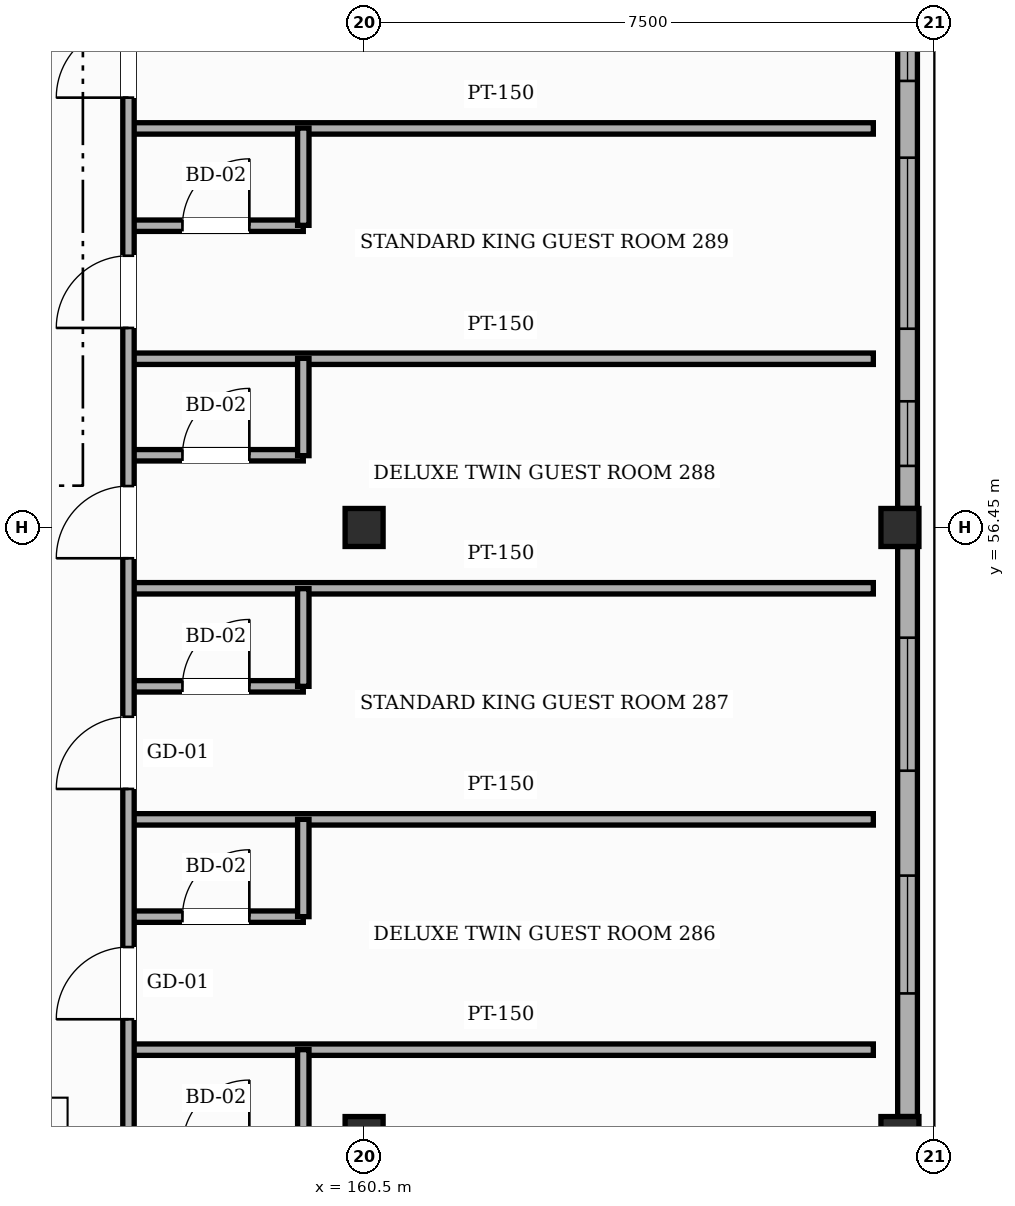
"""IFC4 building model, lengths in metres.
Left out: names, types, materials, properties, quantities, classifications, styles, units other than length and angle.
Written with IfcOpenShell. Run it as: python <this file> out.ifc"""

import sys

from ifc_helpers import new_model, si_unit, direction, frame, frame_2d, origin, origin_2d, place, context, subcontext, project, spatial, rectangle, hollow_rectangle, extrude, element, fill, save


model = new_model("IFC4")
c1 = context("Model", 3, precision=1e-05, world=origin(), true_north=direction((0.0, 1.0)))
c2 = subcontext(c1, "Body", "Model", "MODEL_VIEW")
j1 = project(units=[si_unit("LENGTHUNIT", "METRE"), si_unit("PLANEANGLEUNIT", "RADIAN")], contexts=[c1])
p1 = place(None, origin())
s1 = spatial("IfcSite", under=j1, at=p1, CompositionType="ELEMENT")
p2 = place(p1, origin())
s2 = spatial("IfcBuilding", under=s1, at=p2, CompositionType="ELEMENT")
p3 = place(p2, frame((0.0, 0.0, 39.0)))
s3 = spatial("IfcBuildingStorey", under=s2, at=p3, CompositionType="ELEMENT", Elevation=39.0)
for number, where, z_axis, x_axis in (
    (1, (160.5, 48.45, 0.0), (0.0, 0.0, 1.0), (1.0, 0.0, 0.0)),
    (2, (160.5, 56.45, 0.0), (0.0, 0.0, 1.0), (1.0, 0.0, 0.0)),
    (3, (167.55, 48.45, 0.0), (0.0, 0.0, 1.0), (1.0, 0.0, 0.0)),
    (4, (167.55, 56.45, 0.0), (0.0, 0.0, 1.0), (1.0, 0.0, 0.0)),
):
    element("IfcColumn", number, at=place(p3, frame(where, z_axis=z_axis, x_axis=x_axis)), inside=s3, PredefinedType="COLUMN", context=c2, shape_type="SweptSolid", body=[
        extrude(hollow_rectangle(XDim=0.5, YDim=0.5, WallThickness=0.022, InnerFilletRadius=0.022, OuterFilletRadius=0.044, at=origin_2d()), origin(), (0.0, 0.0, 1.0), 3.6),
    ])
p4 = place(p3, frame((167.65, 56.2, 0.0), z_axis=(0.0, 0.0, 1.0), x_axis=(0.0, -1.0, 0.0)))
e5 = element("IfcWall", 5, at=p4, inside=s3, PredefinedType="SOLIDWALL", context=c2, shape_type="SweptSolid", body=[
    extrude(rectangle(XDim=7.5, YDim=0.26, at=frame_2d((3.75, 0.0))), origin(), (0.0, 0.0, 1.0), 2.755),
])
p5 = place(p4, frame((4.33, 0.0, 0.85)))
e6 = element("IfcOpeningElement", 6, at=p5, cuts=e5, PredefinedType="OPENING", context=c2, shape_type="SweptSolid", body=[
    extrude(rectangle(XDim=1.55, YDim=1.35, at=frame_2d((0.775, 0.675))), frame((0.0, 0.14, 0.0), z_axis=(0.0, -1.0, 0.0), x_axis=(1.0, 0.0, 0.0)), (0.0, 0.0, 1.0), 0.28),
])
p6 = place(p4, frame((1.2, 0.0, 0.85)))
e7 = element("IfcOpeningElement", 7, at=p6, cuts=e5, PredefinedType="OPENING", context=c2, shape_type="SweptSolid", body=[
    extrude(rectangle(XDim=1.75, YDim=1.35, at=frame_2d((0.875, 0.675))), frame((0.0, 0.14, 0.0), z_axis=(0.0, -1.0, 0.0), x_axis=(1.0, 0.0, 0.0)), (0.0, 0.0, 1.0), 0.28),
])
p7 = place(p3, frame((167.65, 64.2, 0.0), z_axis=(0.0, 0.0, 1.0), x_axis=(0.0, -1.0, 0.0)))
e8 = element("IfcWall", 8, at=p7, inside=s3, PredefinedType="SOLIDWALL", context=c2, shape_type="SweptSolid", body=[
    extrude(rectangle(XDim=7.5, YDim=0.26, at=frame_2d((3.75, 0.0))), origin(), (0.0, 0.0, 1.0), 2.755),
])
p8 = place(p7, frame((6.09, 0.0, 0.85)))
e9 = element("IfcOpeningElement", 9, at=p8, cuts=e8, PredefinedType="OPENING", context=c2, shape_type="SweptSolid", body=[
    extrude(rectangle(XDim=0.85, YDim=1.35, at=frame_2d((0.425, 0.675))), frame((0.0, 0.14, 0.0), z_axis=(0.0, -1.0, 0.0), x_axis=(1.0, 0.0, 0.0)), (0.0, 0.0, 1.0), 0.28),
])
p9 = place(p7, frame((2.885, 0.0, 0.85)))
e10 = element("IfcOpeningElement", 10, at=p9, cuts=e8, PredefinedType="OPENING", context=c2, shape_type="SweptSolid", body=[
    extrude(rectangle(XDim=2.25, YDim=1.35, at=frame_2d((1.125, 0.675))), frame((0.0, 0.14, 0.0), z_axis=(0.0, -1.0, 0.0), x_axis=(1.0, 0.0, 0.0)), (0.0, 0.0, 1.0), 0.28),
])
p10 = place(p7, frame((0.625, 0.0, 0.85)))
e11 = element("IfcOpeningElement", 11, at=p10, cuts=e8, PredefinedType="OPENING", context=c2, shape_type="SweptSolid", body=[
    extrude(rectangle(XDim=1.25, YDim=1.5, at=frame_2d((0.625, 0.75))), frame((0.0, 0.14, 0.0), z_axis=(0.0, -1.0, 0.0), x_axis=(1.0, 0.0, 0.0)), (0.0, 0.0, 1.0), 0.28),
])
p11 = place(p3, frame((157.4, 49.58, 0.0), z_axis=(0.0, 0.0, 1.0), x_axis=(1.0, 0.0, 0.0)))
e12 = element("IfcWall", 12, at=p11, inside=s3, PredefinedType="PARTITIONING", context=c2, shape_type="SweptSolid", body=[
    extrude(rectangle(XDim=9.8, YDim=0.15, at=frame_2d((4.9, 0.0))), origin(), (0.0, 0.0, 1.0), 3.365),
])
p12 = place(p3, frame((157.4, 51.33, 0.0), z_axis=(0.0, 0.0, 1.0), x_axis=(1.0, 0.0, 0.0)))
e13 = element("IfcWall", 13, at=p12, inside=s3, PredefinedType="PARTITIONING", context=c2, shape_type="SweptSolid", body=[
    extrude(rectangle(XDim=2.3, YDim=0.15, at=frame_2d((1.15, 0.0))), origin(), (0.0, 0.0, 1.0), 3.365),
])
p13 = place(p12, frame((0.71, 0.0, 0.0)))
e14 = element("IfcOpeningElement", 14, at=p13, cuts=e13, PredefinedType="OPENING", context=c2, shape_type="SweptSolid", body=[
    extrude(rectangle(XDim=0.88, YDim=2.12, at=frame_2d((0.44, 1.06))), frame((0.0, 0.085, 0.0), z_axis=(0.0, -1.0, 0.0), x_axis=(1.0, 0.0, 0.0)), (0.0, 0.0, 1.0), 0.17),
])
p14 = place(p3, frame((157.4, 52.61, 0.0), z_axis=(0.0, 0.0, 1.0), x_axis=(1.0, 0.0, 0.0)))
e15 = element("IfcWall", 15, at=p14, inside=s3, PredefinedType="PARTITIONING", context=c2, shape_type="SweptSolid", body=[
    extrude(rectangle(XDim=9.8, YDim=0.15, at=frame_2d((4.9, 0.0))), origin(), (0.0, 0.0, 1.0), 3.055),
])
p15 = place(p3, frame((157.4, 54.36, 0.0), z_axis=(0.0, 0.0, 1.0), x_axis=(1.0, 0.0, 0.0)))
e16 = element("IfcWall", 16, at=p15, inside=s3, PredefinedType="PARTITIONING", context=c2, shape_type="SweptSolid", body=[
    extrude(rectangle(XDim=2.3, YDim=0.15, at=frame_2d((1.15, 0.0))), origin(), (0.0, 0.0, 1.0), 3.365),
])
p16 = place(p15, frame((0.71, 0.0, 0.0)))
e17 = element("IfcOpeningElement", 17, at=p16, cuts=e16, PredefinedType="OPENING", context=c2, shape_type="SweptSolid", body=[
    extrude(rectangle(XDim=0.88, YDim=2.12, at=frame_2d((0.44, 1.06))), frame((0.0, 0.085, 0.0), z_axis=(0.0, -1.0, 0.0), x_axis=(1.0, 0.0, 0.0)), (0.0, 0.0, 1.0), 0.17),
])
p17 = place(p3, frame((157.4, 55.65, 0.0), z_axis=(0.0, 0.0, 1.0), x_axis=(1.0, 0.0, 0.0)))
e18 = element("IfcWall", 18, at=p17, inside=s3, PredefinedType="PARTITIONING", context=c2, shape_type="SweptSolid", body=[
    extrude(rectangle(XDim=9.8, YDim=0.15, at=frame_2d((4.9, 0.0))), origin(), (0.0, 0.0, 1.0), 3.365),
])
p18 = place(p3, frame((157.4, 57.4, 0.0), z_axis=(0.0, 0.0, 1.0), x_axis=(1.0, 0.0, 0.0)))
e19 = element("IfcWall", 19, at=p18, inside=s3, PredefinedType="PARTITIONING", context=c2, shape_type="SweptSolid", body=[
    extrude(rectangle(XDim=2.3, YDim=0.15, at=frame_2d((1.15, 0.0))), origin(), (0.0, 0.0, 1.0), 3.365),
])
p19 = place(p18, frame((0.71, 0.0, 0.0)))
e20 = element("IfcOpeningElement", 20, at=p19, cuts=e19, PredefinedType="OPENING", context=c2, shape_type="SweptSolid", body=[
    extrude(rectangle(XDim=0.88, YDim=2.12, at=frame_2d((0.44, 1.06))), frame((0.0, 0.085, 0.0), z_axis=(0.0, -1.0, 0.0), x_axis=(1.0, 0.0, 0.0)), (0.0, 0.0, 1.0), 0.17),
])
p20 = place(p3, frame((157.4, 58.67, 0.0), z_axis=(0.0, 0.0, 1.0), x_axis=(1.0, 0.0, 0.0)))
e21 = element("IfcWall", 21, at=p20, inside=s3, PredefinedType="PARTITIONING", context=c2, shape_type="SweptSolid", body=[
    extrude(rectangle(XDim=9.8, YDim=0.15, at=frame_2d((4.9, 0.0))), origin(), (0.0, 0.0, 1.0), 3.365),
])
p21 = place(p3, frame((157.4, 60.42, 0.0), z_axis=(0.0, 0.0, 1.0), x_axis=(1.0, 0.0, 0.0)))
e22 = element("IfcWall", 22, at=p21, inside=s3, PredefinedType="PARTITIONING", context=c2, shape_type="SweptSolid", body=[
    extrude(rectangle(XDim=2.3, YDim=0.15, at=frame_2d((1.15, 0.0))), origin(), (0.0, 0.0, 1.0), 3.365),
])
p22 = place(p21, frame((0.71, 0.0, 0.0)))
e23 = element("IfcOpeningElement", 23, at=p22, cuts=e22, PredefinedType="OPENING", context=c2, shape_type="SweptSolid", body=[
    extrude(rectangle(XDim=0.88, YDim=2.12, at=frame_2d((0.44, 1.06))), frame((0.0, 0.085, 0.0), z_axis=(0.0, -1.0, 0.0), x_axis=(1.0, 0.0, 0.0)), (0.0, 0.0, 1.0), 0.17),
])
p23 = place(p3, frame((157.4, 61.7, 0.0), z_axis=(0.0, 0.0, 1.0), x_axis=(1.0, 0.0, 0.0)))
e24 = element("IfcWall", 24, at=p23, inside=s3, PredefinedType="PARTITIONING", context=c2, shape_type="SweptSolid", body=[
    extrude(rectangle(XDim=9.8, YDim=0.15, at=frame_2d((4.9, 0.0))), origin(), (0.0, 0.0, 1.0), 3.365),
])
p24 = place(p3, frame((157.4, 22.3, 0.0), z_axis=(0.0, 0.0, 1.0), x_axis=(0.0, 1.0, 0.0)))
e25 = element("IfcWall", 25, at=p24, inside=s3, PredefinedType="PARTITIONING", context=c2, shape_type="SweptSolid", body=[
    extrude(rectangle(XDim=48.5, YDim=0.15, at=frame_2d((24.25, 0.0))), origin(), (0.0, 0.0, 1.0), 3.365),
])
p25 = place(p24, frame((0.325, 0.0, 0.0)))
e26 = element("IfcOpeningElement", 26, at=p25, cuts=e25, PredefinedType="OPENING", context=c2, shape_type="SweptSolid", body=[
    extrude(rectangle(XDim=1.1, YDim=2.2, at=frame_2d((0.55, 1.1))), frame((0.0, 0.085, 0.0), z_axis=(0.0, -1.0, 0.0), x_axis=(1.0, 0.0, 0.0)), (0.0, 0.0, 1.0), 0.17),
])
p26 = place(p24, frame((3.43, 0.0, 0.0)))
e27 = element("IfcOpeningElement", 27, at=p26, cuts=e25, PredefinedType="OPENING", context=c2, shape_type="SweptSolid", body=[
    extrude(rectangle(XDim=0.95, YDim=2.15, at=frame_2d((0.475, 1.075))), frame((0.0, 0.085, 0.0), z_axis=(0.0, -1.0, 0.0), x_axis=(1.0, 0.0, 0.0)), (0.0, 0.0, 1.0), 0.17),
])
p27 = place(p24, frame((6.46, 0.0, 0.0)))
e28 = element("IfcOpeningElement", 28, at=p27, cuts=e25, PredefinedType="OPENING", context=c2, shape_type="SweptSolid", body=[
    extrude(rectangle(XDim=0.95, YDim=2.15, at=frame_2d((0.475, 1.075))), frame((0.0, 0.085, 0.0), z_axis=(0.0, -1.0, 0.0), x_axis=(1.0, 0.0, 0.0)), (0.0, 0.0, 1.0), 0.17),
])
p28 = place(p24, frame((9.495, 0.0, 0.0)))
e29 = element("IfcOpeningElement", 29, at=p28, cuts=e25, PredefinedType="OPENING", context=c2, shape_type="SweptSolid", body=[
    extrude(rectangle(XDim=0.95, YDim=2.15, at=frame_2d((0.475, 1.075))), frame((0.0, 0.085, 0.0), z_axis=(0.0, -1.0, 0.0), x_axis=(1.0, 0.0, 0.0)), (0.0, 0.0, 1.0), 0.17),
])
p29 = place(p24, frame((12.525, 0.0, 0.0)))
e30 = element("IfcOpeningElement", 30, at=p29, cuts=e25, PredefinedType="OPENING", context=c2, shape_type="SweptSolid", body=[
    extrude(rectangle(XDim=0.95, YDim=2.15, at=frame_2d((0.475, 1.075))), frame((0.0, 0.085, 0.0), z_axis=(0.0, -1.0, 0.0), x_axis=(1.0, 0.0, 0.0)), (0.0, 0.0, 1.0), 0.17),
])
p30 = place(p24, frame((15.555, 0.0, 0.0)))
e31 = element("IfcOpeningElement", 31, at=p30, cuts=e25, PredefinedType="OPENING", context=c2, shape_type="SweptSolid", body=[
    extrude(rectangle(XDim=0.95, YDim=2.15, at=frame_2d((0.475, 1.075))), frame((0.0, 0.085, 0.0), z_axis=(0.0, -1.0, 0.0), x_axis=(1.0, 0.0, 0.0)), (0.0, 0.0, 1.0), 0.17),
])
p31 = place(p24, frame((18.585, 0.0, 0.0)))
e32 = element("IfcOpeningElement", 32, at=p31, cuts=e25, PredefinedType="OPENING", context=c2, shape_type="SweptSolid", body=[
    extrude(rectangle(XDim=0.95, YDim=2.15, at=frame_2d((0.475, 1.075))), frame((0.0, 0.085, 0.0), z_axis=(0.0, -1.0, 0.0), x_axis=(1.0, 0.0, 0.0)), (0.0, 0.0, 1.0), 0.17),
])
p32 = place(p24, frame((21.62, 0.0, 0.0)))
e33 = element("IfcOpeningElement", 33, at=p32, cuts=e25, PredefinedType="OPENING", context=c2, shape_type="SweptSolid", body=[
    extrude(rectangle(XDim=0.95, YDim=2.15, at=frame_2d((0.475, 1.075))), frame((0.0, 0.085, 0.0), z_axis=(0.0, -1.0, 0.0), x_axis=(1.0, 0.0, 0.0)), (0.0, 0.0, 1.0), 0.17),
])
p33 = place(p24, frame((24.65, 0.0, 0.0)))
e34 = element("IfcOpeningElement", 34, at=p33, cuts=e25, PredefinedType="OPENING", context=c2, shape_type="SweptSolid", body=[
    extrude(rectangle(XDim=0.95, YDim=2.15, at=frame_2d((0.475, 1.075))), frame((0.0, 0.085, 0.0), z_axis=(0.0, -1.0, 0.0), x_axis=(1.0, 0.0, 0.0)), (0.0, 0.0, 1.0), 0.17),
])
p34 = place(p24, frame((27.68, 0.0, 0.0)))
e35 = element("IfcOpeningElement", 35, at=p34, cuts=e25, PredefinedType="OPENING", context=c2, shape_type="SweptSolid", body=[
    extrude(rectangle(XDim=0.95, YDim=2.15, at=frame_2d((0.475, 1.075))), frame((0.0, 0.085, 0.0), z_axis=(0.0, -1.0, 0.0), x_axis=(1.0, 0.0, 0.0)), (0.0, 0.0, 1.0), 0.17),
])
p35 = place(p24, frame((30.71, 0.0, 0.0)))
e36 = element("IfcOpeningElement", 36, at=p35, cuts=e25, PredefinedType="OPENING", context=c2, shape_type="SweptSolid", body=[
    extrude(rectangle(XDim=0.95, YDim=2.15, at=frame_2d((0.475, 1.075))), frame((0.0, 0.085, 0.0), z_axis=(0.0, -1.0, 0.0), x_axis=(1.0, 0.0, 0.0)), (0.0, 0.0, 1.0), 0.17),
])
p36 = place(p24, frame((33.745, 0.0, 0.0)))
e37 = element("IfcOpeningElement", 37, at=p36, cuts=e25, PredefinedType="OPENING", context=c2, shape_type="SweptSolid", body=[
    extrude(rectangle(XDim=0.95, YDim=2.15, at=frame_2d((0.475, 1.075))), frame((0.0, 0.085, 0.0), z_axis=(0.0, -1.0, 0.0), x_axis=(1.0, 0.0, 0.0)), (0.0, 0.0, 1.0), 0.17),
])
p37 = place(p24, frame((36.775, 0.0, 0.0)))
e38 = element("IfcOpeningElement", 38, at=p37, cuts=e25, PredefinedType="OPENING", context=c2, shape_type="SweptSolid", body=[
    extrude(rectangle(XDim=0.95, YDim=2.15, at=frame_2d((0.475, 1.075))), frame((0.0, 0.085, 0.0), z_axis=(0.0, -1.0, 0.0), x_axis=(1.0, 0.0, 0.0)), (0.0, 0.0, 1.0), 0.17),
])
p38 = place(p24, frame((39.805, 0.0, 0.0)))
e39 = element("IfcOpeningElement", 39, at=p38, cuts=e25, PredefinedType="OPENING", context=c2, shape_type="SweptSolid", body=[
    extrude(rectangle(XDim=0.95, YDim=2.15, at=frame_2d((0.475, 1.075))), frame((0.0, 0.085, 0.0), z_axis=(0.0, -1.0, 0.0), x_axis=(1.0, 0.0, 0.0)), (0.0, 0.0, 1.0), 0.17),
])
p39 = place(p24, frame((42.84, 0.0, 0.0)))
e40 = element("IfcOpeningElement", 40, at=p39, cuts=e25, PredefinedType="OPENING", context=c2, shape_type="SweptSolid", body=[
    extrude(rectangle(XDim=0.95, YDim=2.15, at=frame_2d((0.475, 1.075))), frame((0.0, 0.085, 0.0), z_axis=(0.0, -1.0, 0.0), x_axis=(1.0, 0.0, 0.0)), (0.0, 0.0, 1.0), 0.17),
])
p40 = place(p24, frame((45.87, 0.0, 0.0)))
e41 = element("IfcOpeningElement", 41, at=p40, cuts=e25, PredefinedType="OPENING", context=c2, shape_type="SweptSolid", body=[
    extrude(rectangle(XDim=0.95, YDim=2.15, at=frame_2d((0.475, 1.075))), frame((0.0, 0.085, 0.0), z_axis=(0.0, -1.0, 0.0), x_axis=(1.0, 0.0, 0.0)), (0.0, 0.0, 1.0), 0.17),
])
for number, where, z_axis, x_axis in (
    (42, (159.7, 48.3, 0.0), (0.0, 0.0, 1.0), (0.0, 1.0, 0.0)),
    (43, (159.7, 51.33, 0.0), (0.0, 0.0, 1.0), (0.0, 1.0, 0.0)),
):
    element("IfcWall", number, at=place(p3, frame(where, z_axis=z_axis, x_axis=x_axis)), inside=s3, PredefinedType="PARTITIONING", context=c2, shape_type="SweptSolid", body=[
        extrude(rectangle(XDim=1.28, YDim=0.15, at=frame_2d((0.64, 0.0))), origin(), (0.0, 0.0, 1.0), 3.365),
    ])
p41 = place(p3, frame((159.7, 54.36, 0.0), z_axis=(0.0, 0.0, 1.0), x_axis=(0.0, 1.0, 0.0)))
e44 = element("IfcWall", 44, at=p41, inside=s3, PredefinedType="PARTITIONING", context=c2, shape_type="SweptSolid", body=[
    extrude(rectangle(XDim=1.285, YDim=0.15, at=frame_2d((0.643, 0.0))), origin(), (0.0, 0.0, 1.0), 3.365),
])
for number, where, z_axis, x_axis in (
    (45, (159.7, 57.395, 0.0), (0.0, 0.0, 1.0), (0.0, 1.0, 0.0)),
    (46, (159.7, 60.425, 0.0), (0.0, 0.0, 1.0), (0.0, 1.0, 0.0)),
):
    element("IfcWall", number, at=place(p3, frame(where, z_axis=z_axis, x_axis=x_axis)), inside=s3, PredefinedType="PARTITIONING", context=c2, shape_type="SweptSolid", body=[
        extrude(rectangle(XDim=1.28, YDim=0.15, at=frame_2d((0.64, 0.0))), origin(), (0.0, 0.0, 1.0), 3.365),
    ])
p42 = place(p5, origin())
e47 = element("IfcWindow", 47, at=p42, inside=s3, PartitioningType="SINGLE_PANEL", PredefinedType="WINDOW", context=c2, shape_type="SweptSolid", body=[
    extrude(rectangle(XDim=1.55, YDim=1.35, at=frame_2d((0.775, 0.675))), frame((0.0, 0.03, 0.0), z_axis=(0.0, -1.0, 0.0), x_axis=(1.0, 0.0, 0.0)), (0.0, 0.0, 1.0), 0.06),
])
fill(e6, e47)
p43 = place(p6, origin())
e48 = element("IfcWindow", 48, at=p43, inside=s3, PartitioningType="SINGLE_PANEL", PredefinedType="WINDOW", context=c2, shape_type="SweptSolid", body=[
    extrude(rectangle(XDim=1.75, YDim=1.35, at=frame_2d((0.875, 0.675))), frame((0.0, 0.03, 0.0), z_axis=(0.0, -1.0, 0.0), x_axis=(1.0, 0.0, 0.0)), (0.0, 0.0, 1.0), 0.06),
])
fill(e7, e48)
p44 = place(p8, origin())
e49 = element("IfcWindow", 49, at=p44, inside=s3, PartitioningType="SINGLE_PANEL", PredefinedType="WINDOW", context=c2, shape_type="SweptSolid", body=[
    extrude(rectangle(XDim=0.85, YDim=1.35, at=frame_2d((0.425, 0.675))), frame((0.0, 0.03, 0.0), z_axis=(0.0, -1.0, 0.0), x_axis=(1.0, 0.0, 0.0)), (0.0, 0.0, 1.0), 0.06),
])
fill(e9, e49)
p45 = place(p9, origin())
e50 = element("IfcWindow", 50, at=p45, inside=s3, PartitioningType="SINGLE_PANEL", PredefinedType="WINDOW", context=c2, shape_type="SweptSolid", body=[
    extrude(rectangle(XDim=2.25, YDim=1.35, at=frame_2d((1.125, 0.675))), frame((0.0, 0.03, 0.0), z_axis=(0.0, -1.0, 0.0), x_axis=(1.0, 0.0, 0.0)), (0.0, 0.0, 1.0), 0.06),
])
fill(e10, e50)
p46 = place(p10, origin())
e51 = element("IfcWindow", 51, at=p46, inside=s3, PartitioningType="SINGLE_PANEL", PredefinedType="WINDOW", context=c2, shape_type="SweptSolid", body=[
    extrude(rectangle(XDim=1.25, YDim=1.5, at=frame_2d((0.625, 0.75))), frame((0.0, 0.03, 0.0), z_axis=(0.0, -1.0, 0.0), x_axis=(1.0, 0.0, 0.0)), (0.0, 0.0, 1.0), 0.06),
])
fill(e11, e51)
p47 = place(p34, origin())
e52 = element("IfcDoor", 52, at=p47, inside=s3, OperationType="SINGLE_SWING_LEFT", PredefinedType="DOOR", context=c2, shape_type="SweptSolid", body=[
    extrude(rectangle(XDim=0.95, YDim=2.15, at=frame_2d((0.475, 1.075))), frame((0.0, 0.025, 0.0), z_axis=(0.0, -1.0, 0.0), x_axis=(1.0, 0.0, 0.0)), (0.0, 0.0, 1.0), 0.05),
])
fill(e35, e52)
p48 = place(p13, origin())
e53 = element("IfcDoor", 53, at=p48, inside=s3, OperationType="SINGLE_SWING_RIGHT", PredefinedType="DOOR", context=c2, shape_type="SweptSolid", body=[
    extrude(rectangle(XDim=0.88, YDim=2.12, at=frame_2d((0.44, 1.06))), frame((0.0, 0.025, 0.0), z_axis=(0.0, -1.0, 0.0), x_axis=(1.0, 0.0, 0.0)), (0.0, 0.0, 1.0), 0.05),
])
fill(e14, e53)
p49 = place(p35, origin())
e54 = element("IfcDoor", 54, at=p49, inside=s3, OperationType="SINGLE_SWING_LEFT", PredefinedType="DOOR", context=c2, shape_type="SweptSolid", body=[
    extrude(rectangle(XDim=0.95, YDim=2.15, at=frame_2d((0.475, 1.075))), frame((0.0, 0.025, 0.0), z_axis=(0.0, -1.0, 0.0), x_axis=(1.0, 0.0, 0.0)), (0.0, 0.0, 1.0), 0.05),
])
fill(e36, e54)
p50 = place(p16, origin())
e55 = element("IfcDoor", 55, at=p50, inside=s3, OperationType="SINGLE_SWING_RIGHT", PredefinedType="DOOR", context=c2, shape_type="SweptSolid", body=[
    extrude(rectangle(XDim=0.88, YDim=2.12, at=frame_2d((0.44, 1.06))), frame((0.0, 0.025, 0.0), z_axis=(0.0, -1.0, 0.0), x_axis=(1.0, 0.0, 0.0)), (0.0, 0.0, 1.0), 0.05),
])
fill(e17, e55)
p51 = place(p36, origin())
e56 = element("IfcDoor", 56, at=p51, inside=s3, OperationType="SINGLE_SWING_LEFT", PredefinedType="DOOR", context=c2, shape_type="SweptSolid", body=[
    extrude(rectangle(XDim=0.95, YDim=2.15, at=frame_2d((0.475, 1.075))), frame((0.0, 0.025, 0.0), z_axis=(0.0, -1.0, 0.0), x_axis=(1.0, 0.0, 0.0)), (0.0, 0.0, 1.0), 0.05),
])
fill(e37, e56)
p52 = place(p19, origin())
e57 = element("IfcDoor", 57, at=p52, inside=s3, OperationType="SINGLE_SWING_RIGHT", PredefinedType="DOOR", context=c2, shape_type="SweptSolid", body=[
    extrude(rectangle(XDim=0.88, YDim=2.12, at=frame_2d((0.44, 1.06))), frame((0.0, 0.025, 0.0), z_axis=(0.0, -1.0, 0.0), x_axis=(1.0, 0.0, 0.0)), (0.0, 0.0, 1.0), 0.05),
])
fill(e20, e57)
p53 = place(p37, origin())
e58 = element("IfcDoor", 58, at=p53, inside=s3, OperationType="SINGLE_SWING_LEFT", PredefinedType="DOOR", context=c2, shape_type="SweptSolid", body=[
    extrude(rectangle(XDim=0.95, YDim=2.15, at=frame_2d((0.475, 1.075))), frame((0.0, 0.025, 0.0), z_axis=(0.0, -1.0, 0.0), x_axis=(1.0, 0.0, 0.0)), (0.0, 0.0, 1.0), 0.05),
])
fill(e38, e58)
p54 = place(p22, origin())
e59 = element("IfcDoor", 59, at=p54, inside=s3, OperationType="SINGLE_SWING_RIGHT", PredefinedType="DOOR", context=c2, shape_type="SweptSolid", body=[
    extrude(rectangle(XDim=0.88, YDim=2.12, at=frame_2d((0.44, 1.06))), frame((0.0, 0.025, 0.0), z_axis=(0.0, -1.0, 0.0), x_axis=(1.0, 0.0, 0.0)), (0.0, 0.0, 1.0), 0.05),
])
fill(e23, e59)
p55 = place(p38, origin())
e60 = element("IfcDoor", 60, at=p55, inside=s3, OperationType="SINGLE_SWING_LEFT", PredefinedType="DOOR", context=c2, shape_type="SweptSolid", body=[
    extrude(rectangle(XDim=0.95, YDim=2.15, at=frame_2d((0.475, 1.075))), frame((0.0, 0.025, 0.0), z_axis=(0.0, -1.0, 0.0), x_axis=(1.0, 0.0, 0.0)), (0.0, 0.0, 1.0), 0.05),
])
fill(e39, e60)
save(model, sys.argv[1])
